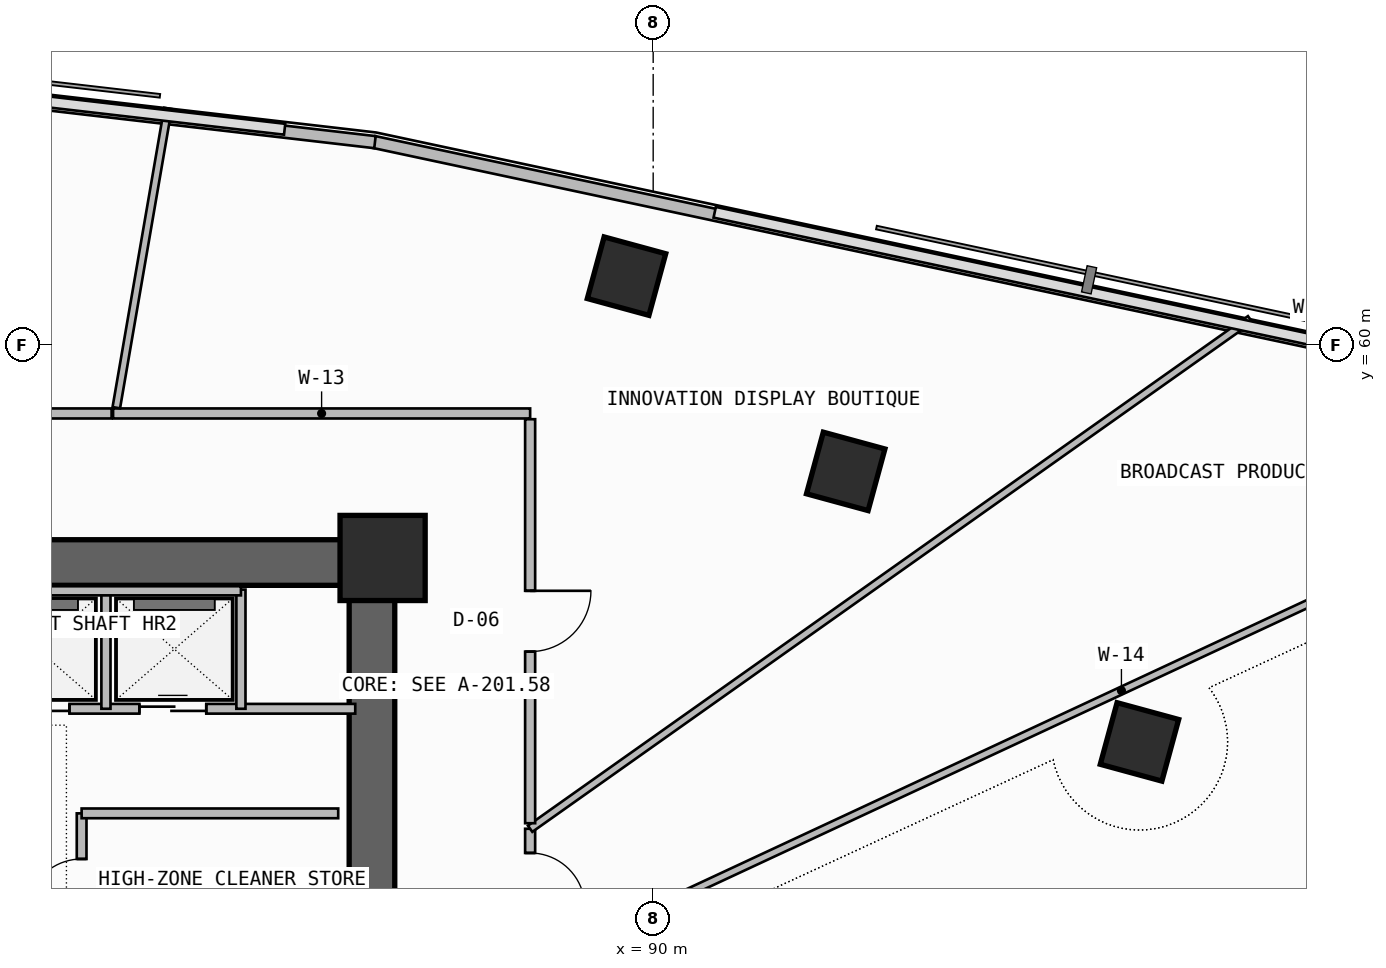
"""IFC4 building model, lengths in metres.
Left out: names, types, materials, properties, quantities, classifications, styles, units other than length and angle.
Written with IfcOpenShell. Run it as: python <this file> out.ifc"""

import sys

from ifc_helpers import new_model, si_unit, direction, frame, frame_2d, origin, origin_2d, place, context, subcontext, project, spatial, rectangle, extrude, element, fill, save


model = new_model("IFC4")
c1 = context("Model", 3, precision=1e-05, world=origin(), true_north=direction((0.0, 1.0)))
c2 = subcontext(c1, "Body", "Model", "MODEL_VIEW")
j1 = project(units=[si_unit("LENGTHUNIT", "METRE"), si_unit("PLANEANGLEUNIT", "RADIAN")], contexts=[c1])
p1 = place(None, origin())
s1 = spatial("IfcSite", under=j1, at=p1, CompositionType="ELEMENT")
p2 = place(p1, origin())
s2 = spatial("IfcBuilding", under=s1, at=p2, CompositionType="ELEMENT")
p3 = place(p2, frame((0.0, 0.0, 207.94)))
s3 = spatial("IfcBuildingStorey", under=s2, at=p3, CompositionType="ELEMENT", Elevation=207.94)
p4 = place(p3, frame((72.0, 56.425, -0.26), z_axis=(0.0, 0.0, 1.0), x_axis=(1.0, 0.0, 0.0)))
e1 = element("IfcWall", 1, at=p4, inside=s3, PredefinedType="SHEAR", context=c2, shape_type="SweptSolid", body=[
    extrude(rectangle(XDim=13.75, YDim=0.75, at=frame_2d((6.875, 0.0))), origin(), (0.0, 0.0, 1.0), 3.52),
])
p5 = place(p3, frame((85.375, 47.6, -0.26), z_axis=(0.0, 0.0, 1.0), x_axis=(0.0, 1.0, 0.0)))
e2 = element("IfcWall", 2, at=p5, inside=s3, PredefinedType="SHEAR", context=c2, shape_type="SweptSolid", body=[
    extrude(rectangle(XDim=8.45, YDim=0.75, at=frame_2d((4.225, 0.0))), origin(), (0.0, 0.0, 1.0), 3.52),
])
p6 = place(p3, frame((85.55, 56.5, 0.0), z_axis=(0.0, 0.0, 1.0), x_axis=(1.0, 0.0, 0.0)))
e3 = element("IfcColumn", 3, at=p6, inside=s3, PredefinedType="COLUMN", context=c2, shape_type="SweptSolid", body=[
    extrude(rectangle(XDim=1.4, YDim=1.4, at=origin_2d()), origin(), (0.0, 0.0, 1.0), 3.52),
])
for number, where, z_axis, x_axis in (
    (4, (97.998, 53.475, 0.0), (0.0, 0.0, 1.0), (0.263, 0.965, 0.0)),
    (5, (93.167, 57.924, 0.0), (0.0, 0.0, 1.0), (0.263, 0.965, 0.0)),
    (6, (89.562, 61.135, 0.0), (0.0, 0.0, 1.0), (0.263, 0.965, 0.0)),
):
    element("IfcColumn", number, at=place(p3, frame(where, z_axis=z_axis, x_axis=x_axis)), inside=s3, PredefinedType="COLUMN", context=c2, shape_type="SweptSolid", body=[
        extrude(rectangle(XDim=1.05, YDim=1.05, at=origin_2d()), origin(), (0.0, 0.0, 1.0), 3.52),
    ])
p7 = place(p3, frame((116.396, 56.722, 0.0), z_axis=(0.0, 0.0, 1.0), x_axis=(-0.977936620644, 0.208901809478, 0.0)))
e7 = element("IfcWall", 7, at=p7, inside=s3, PredefinedType="PARAPET", context=c2, shape_type="SweptSolid", body=[
    extrude(rectangle(XDim=31.685, YDim=0.2, at=frame_2d((15.843, 0.0))), origin(), (0.0, 0.0, 1.0), 1.15),
])
p8 = place(p3, frame((85.424, 63.338, 0.0), z_axis=(0.0, 0.0, 1.0), x_axis=(-0.993364714048, 0.115006716693, 0.0)))
e8 = element("IfcWall", 8, at=p8, inside=s3, PredefinedType="PARAPET", context=c2, shape_type="SweptSolid", body=[
    extrude(rectangle(XDim=26.302, YDim=0.2, at=frame_2d((13.151, 0.0))), origin(), (0.0, 0.0, 1.0), 1.15),
])
p9 = place(p3, frame((80.6, 47.7, 0.0), z_axis=(0.0, 0.0, 1.0), x_axis=(0.0, 1.0, 0.0)))
e9 = element("IfcWall", 9, at=p9, inside=s3, PredefinedType="SOLIDWALL", context=c2, shape_type="SweptSolid", body=[
    extrude(rectangle(XDim=4.6, YDim=0.16, at=frame_2d((2.3, 0.0))), origin(), (0.0, 0.0, 1.0), 3.26),
])
p10 = place(p9, frame((0.75, 0.0, 0.0)))
e10 = element("IfcOpeningElement", 10, at=p10, cuts=e9, PredefinedType="OPENING", context=c2, shape_type="SweptSolid", body=[
    extrude(rectangle(XDim=1.0, YDim=2.2, at=frame_2d((0.5, 1.1))), frame((0.0, 0.09, 0.0), z_axis=(0.0, -1.0, 0.0), x_axis=(1.0, 0.0, 0.0)), (0.0, 0.0, 1.0), 0.18),
])
p11 = place(p9, frame((2.95, 0.0, 0.0)))
e11 = element("IfcOpeningElement", 11, at=p11, cuts=e9, PredefinedType="OPENING", context=c2, shape_type="SweptSolid", body=[
    extrude(rectangle(XDim=0.9, YDim=2.1, at=frame_2d((0.45, 1.05))), frame((0.0, 0.09, 0.0), z_axis=(0.0, -1.0, 0.0), x_axis=(1.0, 0.0, 0.0)), (0.0, 0.0, 1.0), 0.18),
])
p12 = place(p3, frame((80.6, 52.3, 0.0), z_axis=(0.0, 0.0, 1.0), x_axis=(1.0, 0.0, 0.0)))
e12 = element("IfcWall", 12, at=p12, inside=s3, PredefinedType="SOLIDWALL", context=c2, shape_type="SweptSolid", body=[
    extrude(rectangle(XDim=4.22, YDim=0.16, at=frame_2d((2.11, 0.0))), origin(), (0.0, 0.0, 1.0), 3.26),
])
p13 = place(p3, frame((73.02, 54.02, 0.0), z_axis=(0.0, 0.0, 1.0), x_axis=(1.0, 0.0, 0.0)))
e13 = element("IfcWall", 13, at=p13, inside=s3, PredefinedType="SOLIDWALL", context=c2, shape_type="SweptSolid", body=[
    extrude(rectangle(XDim=12.08, YDim=0.16, at=frame_2d((6.04, 0.0))), origin(), (0.0, 0.0, 1.0), 3.26),
])
p14 = place(p13, frame((4.03, 0.0, 0.0)))
e14 = element("IfcOpeningElement", 14, at=p14, cuts=e13, PredefinedType="OPENING", context=c2, shape_type="SweptSolid", body=[
    extrude(rectangle(XDim=1.1, YDim=2.25, at=frame_2d((0.55, 1.125))), frame((0.0, 0.09, 0.0), z_axis=(0.0, -1.0, 0.0), x_axis=(1.0, 0.0, 0.0)), (0.0, 0.0, 1.0), 0.18),
])
p15 = place(p13, frame((6.28, 0.0, 0.0)))
e15 = element("IfcOpeningElement", 15, at=p15, cuts=e13, PredefinedType="OPENING", context=c2, shape_type="SweptSolid", body=[
    extrude(rectangle(XDim=1.1, YDim=2.25, at=frame_2d((0.55, 1.125))), frame((0.0, 0.09, 0.0), z_axis=(0.0, -1.0, 0.0), x_axis=(1.0, 0.0, 0.0)), (0.0, 0.0, 1.0), 0.18),
])
p16 = place(p13, frame((8.53, 0.0, 0.0)))
e16 = element("IfcOpeningElement", 16, at=p16, cuts=e13, PredefinedType="OPENING", context=c2, shape_type="SweptSolid", body=[
    extrude(rectangle(XDim=1.1, YDim=2.25, at=frame_2d((0.55, 1.125))), frame((0.0, 0.09, 0.0), z_axis=(0.0, -1.0, 0.0), x_axis=(1.0, 0.0, 0.0)), (0.0, 0.0, 1.0), 0.18),
])
p17 = place(p3, frame((81.0, 54.02, 0.0), z_axis=(0.0, 0.0, 1.0), x_axis=(0.0, 1.0, 0.0)))
e17 = element("IfcWall", 17, at=p17, inside=s3, PredefinedType="PLUMBINGWALL", context=c2, shape_type="SweptSolid", body=[
    extrude(rectangle(XDim=1.96, YDim=0.15, at=frame_2d((0.98, 0.0))), origin(), (0.0, 0.0, 1.0), 3.26),
])
p18 = place(p3, frame((83.22, 54.02, 0.0), z_axis=(0.0, 0.0, 1.0), x_axis=(0.0, 1.0, 0.0)))
e18 = element("IfcWall", 18, at=p18, inside=s3, PredefinedType="SOLIDWALL", context=c2, shape_type="SweptSolid", body=[
    extrude(rectangle(XDim=1.96, YDim=0.15, at=frame_2d((0.98, 0.0))), origin(), (0.0, 0.0, 1.0), 3.26),
])
p19 = place(p3, frame((76.52, 55.96, 0.0), z_axis=(0.0, 0.0, 1.0), x_axis=(1.0, 0.0, 0.0)))
e19 = element("IfcWall", 19, at=p19, inside=s3, PredefinedType="SOLIDWALL", context=c2, shape_type="SweptSolid", body=[
    extrude(rectangle(XDim=6.7, YDim=0.15, at=frame_2d((3.35, 0.0))), origin(), (0.0, 0.0, 1.0), 3.26),
])
p20 = place(p3, frame((88.048, 49.82, 0.0), z_axis=(0.0, 0.0, 1.0), x_axis=(0.906409961827, 0.422399078006, 0.0)))
e20 = element("IfcWall", 20, at=p20, inside=s3, PredefinedType="PARTITIONING", context=c2, shape_type="SweptSolid", body=[
    extrude(rectangle(XDim=21.299, YDim=0.125, at=frame_2d((10.649, 0.0))), origin(), (0.0, 0.0, 1.0), 2.645),
])
p21 = place(p3, frame((87.976, 49.846, 0.0), z_axis=(0.0, 0.0, 1.0), x_axis=(0.0, 1.0, 0.0)))
e21 = element("IfcWall", 21, at=p21, inside=s3, PredefinedType="PARTITIONING", context=c2, shape_type="SweptSolid", body=[
    extrude(rectangle(XDim=2.2, YDim=0.165, at=frame_2d((1.1, 0.0))), origin(), (0.0, 0.0, 1.0), 3.26),
])
p22 = place(p21, frame((0.902, 0.0, 0.0)))
e22 = element("IfcOpeningElement", 22, at=p22, cuts=e21, PredefinedType="OPENING", context=c2, shape_type="SweptSolid", body=[
    extrude(rectangle(XDim=0.9, YDim=2.1, at=frame_2d((0.45, 1.05))), frame((0.0, 0.093, 0.0), z_axis=(0.0, -1.0, 0.0), x_axis=(1.0, 0.0, 0.0)), (0.0, 0.0, 1.0), 0.185),
])
p23 = place(p3, frame((87.976, 52.047, 0.0), z_axis=(0.0, 0.0, 1.0), x_axis=(0.81628635006, 0.577647465765, 0.0)))
e23 = element("IfcWall", 23, at=p23, inside=s3, PredefinedType="PARTITIONING", context=c2, shape_type="SweptSolid", body=[
    extrude(rectangle(XDim=14.507, YDim=0.125, at=frame_2d((7.253, 0.0))), origin(), (0.0, 0.0, 1.0), 2.645),
])
p24 = place(p3, frame((87.976, 58.876, 0.0), z_axis=(0.0, 0.0, 1.0), x_axis=(-1.0, 0.0, 0.0)))
e24 = element("IfcWall", 24, at=p24, inside=s3, PredefinedType="PARTITIONING", context=c2, shape_type="SweptSolid", body=[
    extrude(rectangle(XDim=6.859, YDim=0.165, at=frame_2d((3.43, 0.0))), origin(), (0.0, 0.0, 1.0), 2.745),
])
p25 = place(p3, frame((87.976, 52.138, 0.0), z_axis=(0.0, 0.0, 1.0), x_axis=(0.0, 1.0, 0.0)))
e25 = element("IfcWall", 25, at=p25, inside=s3, PredefinedType="PARTITIONING", context=c2, shape_type="SweptSolid", body=[
    extrude(rectangle(XDim=6.644, YDim=0.165, at=frame_2d((3.322, 0.0))), origin(), (0.0, 0.0, 1.0), 2.745),
])
p26 = place(p25, frame((2.822, 0.0, 0.0)))
e26 = element("IfcOpeningElement", 26, at=p26, cuts=e25, PredefinedType="OPENING", context=c2, shape_type="SweptSolid", body=[
    extrude(rectangle(XDim=1.0, YDim=2.2, at=frame_2d((0.5, 1.1))), frame((0.0, 0.093, 0.0), z_axis=(0.0, -1.0, 0.0), x_axis=(1.0, 0.0, 0.0)), (0.0, 0.0, 1.0), 0.185),
])
p27 = place(p3, frame((81.17, 58.971, 0.0), z_axis=(0.0, 0.0, 1.0), x_axis=(0.170173676804, 0.985414085409, 0.0)))
e27 = element("IfcWall", 27, at=p27, inside=s3, PredefinedType="PARTITIONING", context=c2, shape_type="SweptSolid", body=[
    extrude(rectangle(XDim=4.995, YDim=0.125, at=frame_2d((2.498, 0.0))), origin(), (0.0, 0.0, 1.0), 3.26),
])
p28 = place(p3, frame((81.093, 58.876, 0.0), z_axis=(0.0, 0.0, 1.0), x_axis=(-1.0, 0.0, 0.0)))
e28 = element("IfcWall", 28, at=p28, inside=s3, PredefinedType="PARTITIONING", context=c2, shape_type="SweptSolid", body=[
    extrude(rectangle(XDim=1.349, YDim=0.165, at=frame_2d((0.674, 0.0))), origin(), (0.0, 0.0, 1.0), 3.26),
])
p29 = place(p11, origin())
e29 = element("IfcDoor", 29, at=p29, inside=s3, OperationType="SINGLE_SWING_LEFT", PredefinedType="DOOR", context=c2, shape_type="SweptSolid", body=[
    extrude(rectangle(XDim=0.9, YDim=2.1, at=frame_2d((0.45, 1.05))), frame((0.0, 0.025, 0.0), z_axis=(0.0, -1.0, 0.0), x_axis=(1.0, 0.0, 0.0)), (0.0, 0.0, 1.0), 0.05),
])
fill(e11, e29)
p30 = place(p15, origin())
e30 = element("IfcDoor", 30, at=p30, inside=s3, OperationType="DOUBLE_DOOR_SLIDING", PredefinedType="DOOR", context=c2, shape_type="SweptSolid", body=[
    extrude(rectangle(XDim=1.1, YDim=2.25, at=frame_2d((0.55, 1.125))), frame((0.0, 0.025, 0.0), z_axis=(0.0, -1.0, 0.0), x_axis=(1.0, 0.0, 0.0)), (0.0, 0.0, 1.0), 0.05),
])
fill(e15, e30)
p31 = place(p16, origin())
e31 = element("IfcDoor", 31, at=p31, inside=s3, OperationType="DOUBLE_DOOR_SLIDING", PredefinedType="DOOR", context=c2, shape_type="SweptSolid", body=[
    extrude(rectangle(XDim=1.1, YDim=2.25, at=frame_2d((0.55, 1.125))), frame((0.0, 0.025, 0.0), z_axis=(0.0, -1.0, 0.0), x_axis=(1.0, 0.0, 0.0)), (0.0, 0.0, 1.0), 0.05),
])
fill(e16, e31)
p32 = place(p22, frame((0.9, 0.0, 0.0), z_axis=(0.0, 0.0, 1.0), x_axis=(-1.0, 0.0, 0.0)))
e32 = element("IfcDoor", 32, at=p32, inside=s3, OperationType="SINGLE_SWING_RIGHT", PredefinedType="DOOR", context=c2, shape_type="SweptSolid", body=[
    extrude(rectangle(XDim=0.9, YDim=2.1, at=frame_2d((0.45, 1.05))), frame((0.0, 0.025, 0.0), z_axis=(0.0, -1.0, 0.0), x_axis=(1.0, 0.0, 0.0)), (0.0, 0.0, 1.0), 0.05),
])
fill(e22, e32)
p33 = place(p26, frame((1.0, 0.0, 0.0), z_axis=(0.0, 0.0, 1.0), x_axis=(-1.0, 0.0, 0.0)))
e33 = element("IfcDoor", 33, at=p33, inside=s3, OperationType="SINGLE_SWING_LEFT", PredefinedType="DOOR", context=c2, shape_type="SweptSolid", body=[
    extrude(rectangle(XDim=1.0, YDim=2.2, at=frame_2d((0.5, 1.1))), frame((0.0, 0.025, 0.0), z_axis=(0.0, -1.0, 0.0), x_axis=(1.0, 0.0, 0.0)), (0.0, 0.0, 1.0), 0.05),
])
fill(e26, e33)
save(model, sys.argv[1])
